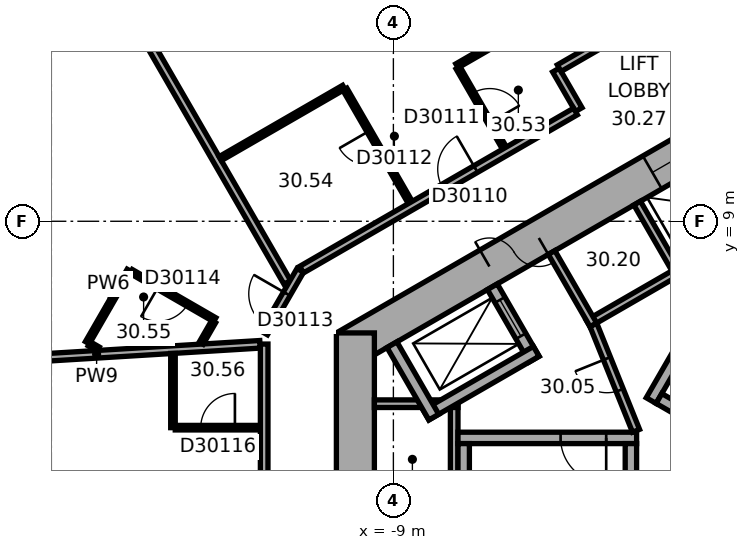
"""IFC4 building model, lengths in metres.
Left out: names, types, materials, properties, quantities, classifications, styles, units other than length and angle.
Written with IfcOpenShell. Run it as: python <this file> out.ifc"""

import sys

from ifc_helpers import new_model, si_unit, direction, frame, frame_2d, origin, place, context, subcontext, project, spatial, rectangle, extrude, element, fill, save


model = new_model("IFC4")
c1 = context("Model", 3, precision=1e-05, world=origin(), true_north=direction((0.0, 1.0)))
c2 = subcontext(c1, "Body", "Model", "MODEL_VIEW")
j1 = project(units=[si_unit("LENGTHUNIT", "METRE"), si_unit("PLANEANGLEUNIT", "RADIAN")], contexts=[c1])
p1 = place(None, origin())
s1 = spatial("IfcSite", under=j1, at=p1, CompositionType="ELEMENT")
p2 = place(p1, origin())
s2 = spatial("IfcBuilding", under=s1, at=p2, CompositionType="ELEMENT")
p3 = place(p2, frame((0.0, 0.0, 124.4)))
s3 = spatial("IfcBuildingStorey", under=s2, at=p3, CompositionType="ELEMENT", Elevation=124.4)
p4 = place(p3, frame((0.25, 11.691, 0.0), z_axis=(0.0, 0.0, 1.0), x_axis=(-0.866022616891, -0.50000482701, 0.0)))
e1 = element("IfcWall", 1, at=p4, inside=s3, PredefinedType="SHEAR", context=c2, shape_type="SweptSolid", body=[
    extrude(rectangle(XDim=12.125, YDim=1.0, at=frame_2d((6.062, 0.0))), origin(), (0.0, 0.0, 1.0), 3.7),
])
p5 = place(p4, frame((6.262, 0.0, 0.0)))
e2 = element("IfcOpeningElement", 2, at=p5, cuts=e1, PredefinedType="OPENING", context=c2, shape_type="SweptSolid", body=[
    extrude(rectangle(XDim=1.5, YDim=2.1, at=frame_2d((0.75, 1.05))), frame((0.0, 0.51, 0.0), z_axis=(0.0, -1.0, 0.0), x_axis=(1.0, 0.0, 0.0)), (0.0, 0.0, 1.0), 1.02),
])
p6 = place(p4, frame((1.712, 0.0, 0.0)))
e3 = element("IfcOpeningElement", 3, at=p6, cuts=e1, PredefinedType="OPENING", context=c2, shape_type="SweptSolid", body=[
    extrude(rectangle(XDim=1.1, YDim=2.1, at=frame_2d((0.55, 1.05))), frame((0.0, 0.51, 0.0), z_axis=(0.0, -1.0, 0.0), x_axis=(1.0, 0.0, 0.0)), (0.0, 0.0, 1.0), 1.02),
])
p7 = place(p3, frame((-10.0, 6.062, 0.0), z_axis=(0.0, 0.0, 1.0), x_axis=(0.0, -1.0, 0.0)))
e4 = element("IfcWall", 4, at=p7, inside=s3, PredefinedType="SHEAR", context=c2, shape_type="SweptSolid", body=[
    extrude(rectangle(XDim=12.125, YDim=1.0, at=frame_2d((6.062, 0.0))), origin(), (0.0, 0.0, 1.0), 3.7),
])
p8 = place(p7, frame((6.612, 0.0, 0.0)))
e5 = element("IfcOpeningElement", 5, at=p8, cuts=e4, PredefinedType="OPENING", context=c2, shape_type="SweptSolid", body=[
    extrude(rectangle(XDim=0.9, YDim=2.1, at=frame_2d((0.45, 1.05))), frame((0.0, 0.51, 0.0), z_axis=(0.0, -1.0, 0.0), x_axis=(1.0, 0.0, 0.0)), (0.0, 0.0, 1.0), 1.02),
])
p9 = place(p3, frame((-2.961, 23.405, 0.0), z_axis=(0.0, 0.0, 1.0), x_axis=(-0.866023315909, -0.500003616288, 0.0)))
e6 = element("IfcWall", 6, at=p9, inside=s3, PredefinedType="STANDARD", context=c2, shape_type="SweptSolid", body=[
    extrude(rectangle(XDim=20.044, YDim=0.2, at=frame_2d((10.022, 0.0))), origin(), (0.0, 0.0, 1.0), 3.7),
])
p10 = place(p9, frame((1.314, 0.0, 0.9)))
e7 = element("IfcOpeningElement", 7, at=p10, cuts=e6, PredefinedType="OPENING", context=c2, shape_type="SweptSolid", body=[
    extrude(rectangle(XDim=2.4, YDim=2.0, at=frame_2d((1.2, 1.0))), frame((0.0, 0.11, 0.0), z_axis=(0.0, -1.0, 0.0), x_axis=(1.0, 0.0, 0.0)), (0.0, 0.0, 1.0), 0.22),
])
p11 = place(p9, frame((5.069, 0.0, 0.9)))
e8 = element("IfcOpeningElement", 8, at=p11, cuts=e6, PredefinedType="OPENING", context=c2, shape_type="SweptSolid", body=[
    extrude(rectangle(XDim=2.4, YDim=2.0, at=frame_2d((1.2, 1.0))), frame((0.0, 0.11, 0.0), z_axis=(0.0, -1.0, 0.0), x_axis=(1.0, 0.0, 0.0)), (0.0, 0.0, 1.0), 0.22),
])
p12 = place(p9, frame((8.823, 0.0, 0.9)))
e9 = element("IfcOpeningElement", 9, at=p12, cuts=e6, PredefinedType="OPENING", context=c2, shape_type="SweptSolid", body=[
    extrude(rectangle(XDim=2.4, YDim=2.0, at=frame_2d((1.2, 1.0))), frame((0.0, 0.11, 0.0), z_axis=(0.0, -1.0, 0.0), x_axis=(1.0, 0.0, 0.0)), (0.0, 0.0, 1.0), 0.22),
])
p13 = place(p9, frame((12.577, 0.0, 0.9)))
e10 = element("IfcOpeningElement", 10, at=p13, cuts=e6, PredefinedType="OPENING", context=c2, shape_type="SweptSolid", body=[
    extrude(rectangle(XDim=2.4, YDim=2.0, at=frame_2d((1.2, 1.0))), frame((0.0, 0.11, 0.0), z_axis=(0.0, -1.0, 0.0), x_axis=(1.0, 0.0, 0.0)), (0.0, 0.0, 1.0), 0.22),
])
p14 = place(p9, frame((16.331, 0.0, 0.9)))
e11 = element("IfcOpeningElement", 11, at=p14, cuts=e6, PredefinedType="OPENING", context=c2, shape_type="SweptSolid", body=[
    extrude(rectangle(XDim=2.4, YDim=2.0, at=frame_2d((1.2, 1.0))), frame((0.0, 0.11, 0.0), z_axis=(0.0, -1.0, 0.0), x_axis=(1.0, 0.0, 0.0)), (0.0, 0.0, 1.0), 0.22),
])
p15 = place(p3, frame((0.803, 9.009, 0.0), z_axis=(0.0, 0.0, 1.0), x_axis=(-0.866028230842, -0.499995103361, 0.0)))
e12 = element("IfcWall", 12, at=p15, inside=s3, PredefinedType="PARTITIONING", context=c2, shape_type="SweptSolid", body=[
    extrude(rectangle(XDim=5.4, YDim=0.2, at=frame_2d((2.7, 0.0))), origin(), (0.0, 0.0, 1.0), 3.42),
])
for number, where, z_axis, x_axis in (
    (13, (-1.485, 7.572, 0.0), (0.0, 0.0, 1.0), (-0.5, 0.866, 0.0)),
    (14, (-3.737, 6.272, 0.0), (0.0, 0.0, 1.0), (-0.5, 0.866, 0.0)),
):
    element("IfcWall", number, at=place(p3, frame(where, z_axis=z_axis, x_axis=x_axis)), inside=s3, PredefinedType="PARTITIONING", context=c2, shape_type="SweptSolid", body=[
        extrude(rectangle(XDim=2.2, YDim=0.2, at=frame_2d((1.1, 0.0))), origin(), (0.0, 0.0, 1.0), 3.42),
    ])
p16 = place(p3, frame((-7.4, 4.3, 0.0), z_axis=(0.0, 0.0, 1.0), x_axis=(0.0, -1.0, 0.0)))
e15 = element("IfcWall", 15, at=p16, inside=s3, PredefinedType="PARTITIONING", context=c2, shape_type="SweptSolid", body=[
    extrude(rectangle(XDim=8.0, YDim=0.2, at=frame_2d((4.0, 0.0))), origin(), (0.0, 0.0, 1.0), 3.42),
])
p17 = place(p3, frame((-7.3, 4.2, 0.0), z_axis=(0.0, 0.0, 1.0), x_axis=(-1.0, 0.0, 0.0)))
e16 = element("IfcWall", 16, at=p17, inside=s3, PredefinedType="PARTITIONING", context=c2, shape_type="SweptSolid", body=[
    extrude(rectangle(XDim=2.2, YDim=0.2, at=frame_2d((1.1, 0.0))), origin(), (0.0, 0.0, 1.0), 3.42),
])
p18 = place(p3, frame((-2.216, 4.282, 0.0), z_axis=(0.0, 0.0, 1.0), x_axis=(0.499977259774, 0.866038532462, 0.0)))
e17 = element("IfcWall", 17, at=p18, inside=s3, PredefinedType="SHEAR", context=c2, shape_type="SweptSolid", body=[
    extrude(rectangle(XDim=4.7, YDim=0.3, at=frame_2d((2.35, 0.0))), origin(), (0.0, 0.0, 1.0), 3.42),
])
p19 = place(p3, frame((4.103, 0.807, 0.0), z_axis=(0.0, 0.0, 1.0), x_axis=(-0.866027801685, 0.499995846692, 0.0)))
e18 = element("IfcWall", 18, at=p19, inside=s3, PredefinedType="SHEAR", context=c2, shape_type="SweptSolid", body=[
    extrude(rectangle(XDim=7.06, YDim=0.3, at=frame_2d((3.53, 0.0))), origin(), (0.0, 0.0, 1.0), 3.42),
])
p20 = place(p3, frame((-2.6, 3.3, 0.0), z_axis=(0.0, 0.0, 1.0), x_axis=(-1.0, 0.0, 0.0)))
e19 = element("IfcWall", 19, at=p20, inside=s3, PredefinedType="SHEAR", context=c2, shape_type="SweptSolid", body=[
    extrude(rectangle(XDim=4.7, YDim=0.3, at=frame_2d((2.35, 0.0))), origin(), (0.0, 0.0, 1.0), 3.42),
])
p21 = place(p20, frame((0.8, 0.0, 0.0)))
e20 = element("IfcOpeningElement", 20, at=p21, cuts=e19, PredefinedType="OPENING", context=c2, shape_type="SweptSolid", body=[
    extrude(rectangle(XDim=1.2, YDim=2.1, at=frame_2d((0.6, 1.05))), frame((0.0, 0.16, 0.0), z_axis=(0.0, -1.0, 0.0), x_axis=(1.0, 0.0, 0.0)), (0.0, 0.0, 1.0), 0.32),
])
for number, where, z_axis, x_axis in (
    (21, (-2.75, 3.15, 0.0), (0.0, 0.0, 1.0), (0.0, -1.0, 0.0)),
    (22, (-7.15, 3.15, 0.0), (0.0, 0.0, 1.0), (0.0, -1.0, 0.0)),
):
    element("IfcWall", number, at=place(p3, frame(where, z_axis=z_axis, x_axis=x_axis)), inside=s3, PredefinedType="SHEAR", context=c2, shape_type="SweptSolid", body=[
        extrude(rectangle(XDim=7.06, YDim=0.3, at=frame_2d((3.53, 0.0))), origin(), (0.0, 0.0, 1.0), 3.42),
    ])
p22 = place(p3, frame((-5.295, 5.372, 0.0), z_axis=(0.0, 0.0, 1.0), x_axis=(-0.500077893725, 0.86598042715, 0.0)))
e23 = element("IfcWall", 23, at=p22, inside=s3, PredefinedType="SHEAR", context=c2, shape_type="SweptSolid", body=[
    extrude(rectangle(XDim=2.2, YDim=0.3, at=frame_2d((1.1, 0.0))), origin(), (0.0, 0.0, 1.0), 3.42),
])
p23 = place(p22, frame((0.7, 0.0, 0.0)))
e24 = element("IfcOpeningElement", 24, at=p23, cuts=e23, PredefinedType="OPENING", context=c2, shape_type="SweptSolid", body=[
    extrude(rectangle(XDim=1.1, YDim=2.1, at=frame_2d((0.55, 1.05))), frame((0.0, 0.16, 0.0), z_axis=(0.0, -1.0, 0.0), x_axis=(1.0, 0.0, 0.0)), (0.0, 0.0, 1.0), 0.32),
])
p24 = place(p3, frame((-5.24, 5.577, 0.0), z_axis=(0.0, 0.0, 1.0), x_axis=(-0.866014461049, -0.500018952895, 0.0)))
e25 = element("IfcWall", 25, at=p24, inside=s3, PredefinedType="SHEAR", context=c2, shape_type="SweptSolid", body=[
    extrude(rectangle(XDim=3.35, YDim=0.3, at=frame_2d((1.675, 0.0))), origin(), (0.0, 0.0, 1.0), 3.42),
])
p25 = place(p3, frame((-7.937, 3.847, 0.0), z_axis=(0.0, 0.0, 1.0), x_axis=(-0.50002983664, 0.866008176907, 0.0)))
e26 = element("IfcWall", 26, at=p25, inside=s3, PredefinedType="SHEAR", context=c2, shape_type="SweptSolid", body=[
    extrude(rectangle(XDim=2.2, YDim=0.3, at=frame_2d((1.1, 0.0))), origin(), (0.0, 0.0, 1.0), 3.42),
])
p26 = place(p3, frame((-2.615, 3.487, 0.0), z_axis=(0.0, 0.0, 1.0), x_axis=(-0.373576831041, 0.92759924068, 0.0)))
e27 = element("IfcWall", 27, at=p26, inside=s3, PredefinedType="PARTITIONING", context=c2, shape_type="SweptSolid", body=[
    extrude(rectangle(XDim=3.002, YDim=0.2, at=frame_2d((1.501, 0.0))), origin(), (0.0, 0.0, 1.0), 3.42),
])
p27 = place(p26, frame((1.15, 0.0, 0.0)))
e28 = element("IfcOpeningElement", 28, at=p27, cuts=e27, PredefinedType="OPENING", context=c2, shape_type="SweptSolid", body=[
    extrude(rectangle(XDim=0.9, YDim=2.1, at=frame_2d((0.45, 1.05))), frame((0.0, 0.11, 0.0), z_axis=(0.0, -1.0, 0.0), x_axis=(1.0, 0.0, 0.0)), (0.0, 0.0, 1.0), 0.22),
])
p28 = place(p3, frame((-21.109, 5.237, 0.0), z_axis=(0.0, 0.0, 1.0), x_axis=(0.998135264293, 0.061040922131, 0.0)))
e29 = element("IfcWall", 29, at=p28, inside=s3, PredefinedType="PARTITIONING", context=c2, shape_type="SweptSolid", body=[
    extrude(rectangle(XDim=8.615, YDim=0.2, at=frame_2d((4.308, 0.0))), origin(), (0.0, 0.0, 1.0), 3.42),
])
p29 = place(p3, frame((-17.052, 5.804, 0.0), z_axis=(0.0, 0.0, 1.0), x_axis=(0.50002983664, 0.866008176907, 0.0)))
e30 = element("IfcWall", 30, at=p29, inside=s3, PredefinedType="PARTITIONING", context=c2, shape_type="SweptSolid", body=[
    extrude(rectangle(XDim=2.2, YDim=0.12, at=frame_2d((1.1, 0.0))), origin(), (0.0, 0.0, 1.0), 3.42),
])
p30 = place(p3, frame((-16.769, 5.64, 0.0), z_axis=(0.0, 0.0, 1.0), x_axis=(-0.865926680471, 0.500170954823, 0.0)))
e31 = element("IfcWall", 31, at=p30, inside=s3, PredefinedType="PARTITIONING", context=c2, shape_type="SweptSolid", body=[
    extrude(rectangle(XDim=0.267, YDim=0.12, at=frame_2d((0.134, 0.0))), origin(), (0.0, 0.0, 1.0), 3.42),
])
p31 = place(p3, frame((-16.018, 14.712, 0.0), z_axis=(0.0, 0.0, 1.0), x_axis=(0.500000843414, -0.866024916838, 0.0)))
e32 = element("IfcWall", 32, at=p31, inside=s3, PredefinedType="PARTITIONING", context=c2, shape_type="SweptSolid", body=[
    extrude(rectangle(XDim=8.452, YDim=0.2, at=frame_2d((4.226, 0.0))), origin(), (0.0, 0.0, 1.0), 3.42),
])
p32 = place(p3, frame((-15.9, 7.679, 0.0), z_axis=(0.0, 0.0, 1.0), x_axis=(0.866022320763, -0.500005339912, 0.0)))
e33 = element("IfcWall", 33, at=p32, inside=s3, PredefinedType="PARTITIONING", context=c2, shape_type="SweptSolid", body=[
    extrude(rectangle(XDim=2.54, YDim=0.12, at=frame_2d((1.27, 0.0))), origin(), (0.0, 0.0, 1.0), 3.42),
])
p33 = place(p32, frame((0.82, 0.0, 0.0)))
e34 = element("IfcOpeningElement", 34, at=p33, cuts=e33, PredefinedType="OPENING", context=c2, shape_type="SweptSolid", body=[
    extrude(rectangle(XDim=0.9, YDim=2.1, at=frame_2d((0.45, 1.05))), frame((0.0, 0.07, 0.0), z_axis=(0.0, -1.0, 0.0), x_axis=(1.0, 0.0, 0.0)), (0.0, 0.0, 1.0), 0.14),
])
p34 = place(p3, frame((-14.8, 3.569, 0.0), z_axis=(0.0, 0.0, 1.0), x_axis=(0.0, 1.0, 0.0)))
e35 = element("IfcWall", 35, at=p34, inside=s3, PredefinedType="PARTITIONING", context=c2, shape_type="SweptSolid", body=[
    extrude(rectangle(XDim=1.953, YDim=0.12, at=frame_2d((0.977, 0.0))), origin(), (0.0, 0.0, 1.0), 3.42),
])
p35 = place(p3, frame((-13.731, 6.357, 0.0), z_axis=(0.0, 0.0, 1.0), x_axis=(-0.500090215447, -0.865973311606, 0.0)))
e36 = element("IfcWall", 36, at=p35, inside=s3, PredefinedType="PARTITIONING", context=c2, shape_type="SweptSolid", body=[
    extrude(rectangle(XDim=0.651, YDim=0.12, at=frame_2d((0.326, 0.0))), origin(), (0.0, 0.0, 1.0), 3.42),
])
p36 = place(p3, frame((-13.556, 10.649, 0.0), z_axis=(0.0, 0.0, 1.0), x_axis=(0.866020939036, 0.500007733091, 0.0)))
e37 = element("IfcWall", 37, at=p36, inside=s3, PredefinedType="PARTITIONING", context=c2, shape_type="SweptSolid", body=[
    extrude(rectangle(XDim=3.753, YDim=0.12, at=frame_2d((1.877, 0.0))), origin(), (0.0, 0.0, 1.0), 3.42),
])
p37 = place(p3, frame((-12.5, 3.569, 0.0), z_axis=(0.0, 0.0, 1.0), x_axis=(-1.0, 0.0, 0.0)))
e38 = element("IfcWall", 38, at=p37, inside=s3, PredefinedType="PARTITIONING", context=c2, shape_type="SweptSolid", body=[
    extrude(rectangle(XDim=2.24, YDim=0.12, at=frame_2d((1.12, 0.0))), origin(), (0.0, 0.0, 1.0), 3.42),
])
p38 = place(p37, frame((0.67, 0.0, 0.0)))
e39 = element("IfcOpeningElement", 39, at=p38, cuts=e38, PredefinedType="OPENING", context=c2, shape_type="SweptSolid", body=[
    extrude(rectangle(XDim=0.9, YDim=2.1, at=frame_2d((0.45, 1.05))), frame((0.0, 0.07, 0.0), z_axis=(0.0, -1.0, 0.0), x_axis=(1.0, 0.0, 0.0)), (0.0, 0.0, 1.0), 0.14),
])
p39 = place(p3, frame((-12.4, 5.769, 0.0), z_axis=(0.0, 0.0, 1.0), x_axis=(0.0, -1.0, 0.0)))
e40 = element("IfcWall", 40, at=p39, inside=s3, PredefinedType="PARTITIONING", context=c2, shape_type="SweptSolid", body=[
    extrude(rectangle(XDim=11.792, YDim=0.2, at=frame_2d((5.896, 0.0))), origin(), (0.0, 0.0, 1.0), 3.42),
])
p40 = place(p39, frame((6.267, 0.0, 0.0)))
e41 = element("IfcOpeningElement", 41, at=p40, cuts=e40, PredefinedType="OPENING", context=c2, shape_type="SweptSolid", body=[
    extrude(rectangle(XDim=1.0, YDim=2.1, at=frame_2d((0.5, 1.05))), frame((0.0, 0.11, 0.0), z_axis=(0.0, -1.0, 0.0), x_axis=(1.0, 0.0, 0.0)), (0.0, 0.0, 1.0), 0.22),
])
p41 = place(p3, frame((-11.45, 7.708, 0.0), z_axis=(0.0, 0.0, 1.0), x_axis=(-0.500022797313, -0.86601224135, 0.0)))
e42 = element("IfcWall", 42, at=p41, inside=s3, PredefinedType="PARTITIONING", context=c2, shape_type="SweptSolid", body=[
    extrude(rectangle(XDim=1.9, YDim=0.2, at=frame_2d((0.95, 0.0))), origin(), (0.0, 0.0, 1.0), 3.42),
])
p42 = place(p41, frame((0.712, 0.0, 0.0)))
e43 = element("IfcOpeningElement", 43, at=p42, cuts=e42, PredefinedType="OPENING", context=c2, shape_type="SweptSolid", body=[
    extrude(rectangle(XDim=1.0, YDim=2.1, at=frame_2d((0.5, 1.05))), frame((0.0, 0.11, 0.0), z_axis=(0.0, -1.0, 0.0), x_axis=(1.0, 0.0, 0.0)), (0.0, 0.0, 1.0), 0.22),
])
p43 = place(p3, frame((-10.275, 12.473, 0.0), z_axis=(0.0, 0.0, 1.0), x_axis=(0.500009156386, -0.866020117278, 0.0)))
e44 = element("IfcWall", 44, at=p43, inside=s3, PredefinedType="PARTITIONING", context=c2, shape_type="SweptSolid", body=[
    extrude(rectangle(XDim=3.44, YDim=0.12, at=frame_2d((1.72, 0.0))), origin(), (0.0, 0.0, 1.0), 3.42),
])
p44 = place(p43, frame((1.27, 0.0, 0.0)))
e45 = element("IfcOpeningElement", 45, at=p44, cuts=e44, PredefinedType="OPENING", context=c2, shape_type="SweptSolid", body=[
    extrude(rectangle(XDim=0.9, YDim=2.1, at=frame_2d((0.45, 1.05))), frame((0.0, 0.07, 0.0), z_axis=(0.0, -1.0, 0.0), x_axis=(1.0, 0.0, 0.0)), (0.0, 0.0, 1.0), 0.14),
])
p45 = place(p3, frame((-7.328, 13.09, 0.0), z_axis=(0.0, 0.0, 1.0), x_axis=(0.866008981251, 0.500028443584, 0.0)))
e46 = element("IfcWall", 46, at=p45, inside=s3, PredefinedType="PARTITIONING", context=c2, shape_type="SweptSolid", body=[
    extrude(rectangle(XDim=3.2, YDim=0.12, at=frame_2d((1.6, 0.0))), origin(), (0.0, 0.0, 1.0), 3.42),
])
p46 = place(p3, frame((-6.078, 10.925, 0.0), z_axis=(0.0, 0.0, 1.0), x_axis=(-0.500002508028, 0.866023955769, 0.0)))
e47 = element("IfcWall", 47, at=p46, inside=s3, PredefinedType="PARTITIONING", context=c2, shape_type="SweptSolid", body=[
    extrude(rectangle(XDim=2.44, YDim=0.12, at=frame_2d((1.22, 0.0))), origin(), (0.0, 0.0, 1.0), 2.87),
])
p47 = place(p46, frame((0.77, 0.0, 0.0)))
e48 = element("IfcOpeningElement", 48, at=p47, cuts=e47, PredefinedType="OPENING", context=c2, shape_type="SweptSolid", body=[
    extrude(rectangle(XDim=0.9, YDim=2.1, at=frame_2d((0.45, 1.05))), frame((0.0, 0.07, 0.0), z_axis=(0.0, -1.0, 0.0), x_axis=(1.0, 0.0, 0.0)), (0.0, 0.0, 1.0), 0.14),
])
p48 = place(p3, frame((-4.723, 12.978, 0.0), z_axis=(0.0, 0.0, 1.0), x_axis=(0.500074377092, -0.865982457891, 0.0)))
e49 = element("IfcWall", 49, at=p48, inside=s3, PredefinedType="PARTITIONING", context=c2, shape_type="SweptSolid", body=[
    extrude(rectangle(XDim=1.201, YDim=0.2, at=frame_2d((0.601, 0.0))), origin(), (0.0, 0.0, 1.0), 3.42),
])
p49 = place(p3, frame((-4.209, 11.888, 0.0), z_axis=(0.0, 0.0, 1.0), x_axis=(-0.866020930448, -0.500007747966, 0.0)))
e50 = element("IfcWall", 50, at=p49, inside=s3, PredefinedType="PARTITIONING", context=c2, shape_type="SweptSolid", body=[
    extrude(rectangle(XDim=8.321, YDim=0.2, at=frame_2d((4.161, 0.0))), origin(), (0.0, 0.0, 1.0), 3.42),
])
p50 = place(p49, frame((3.031, 0.0, 0.0)))
e51 = element("IfcOpeningElement", 51, at=p50, cuts=e50, PredefinedType="OPENING", context=c2, shape_type="SweptSolid", body=[
    extrude(rectangle(XDim=1.0, YDim=2.1, at=frame_2d((0.5, 1.05))), frame((0.0, 0.11, 0.0), z_axis=(0.0, -1.0, 0.0), x_axis=(1.0, 0.0, 0.0)), (0.0, 0.0, 1.0), 0.22),
])
p51 = place(p3, frame((-1.95, 14.579, 0.0), z_axis=(0.0, 0.0, 1.0), x_axis=(-0.866011260204, -0.500024496599, 0.0)))
e52 = element("IfcWall", 52, at=p51, inside=s3, PredefinedType="PARTITIONING", context=c2, shape_type="SweptSolid", body=[
    extrude(rectangle(XDim=3.102, YDim=0.2, at=frame_2d((1.551, 0.0))), origin(), (0.0, 0.0, 1.0), 3.42),
])
p52 = place(p5, origin())
e53 = element("IfcDoor", 53, at=p52, inside=s3, OperationType="DOUBLE_DOOR_SINGLE_SWING", PredefinedType="DOOR", context=c2, shape_type="SweptSolid", body=[
    extrude(rectangle(XDim=1.5, YDim=2.1, at=frame_2d((0.75, 1.05))), frame((0.0, 0.025, 0.0), z_axis=(0.0, -1.0, 0.0), x_axis=(1.0, 0.0, 0.0)), (0.0, 0.0, 1.0), 0.05),
])
fill(e2, e53)
p53 = place(p21, origin())
e54 = element("IfcDoor", 54, at=p53, inside=s3, OperationType="SINGLE_SWING_RIGHT", PredefinedType="DOOR", context=c2, shape_type="SweptSolid", body=[
    extrude(rectangle(XDim=1.2, YDim=2.1, at=frame_2d((0.6, 1.05))), frame((0.0, 0.025, 0.0), z_axis=(0.0, -1.0, 0.0), x_axis=(1.0, 0.0, 0.0)), (0.0, 0.0, 1.0), 0.05),
])
fill(e20, e54)
p54 = place(p27, origin())
e55 = element("IfcDoor", 55, at=p54, inside=s3, OperationType="SINGLE_SWING_LEFT", PredefinedType="DOOR", context=c2, shape_type="SweptSolid", body=[
    extrude(rectangle(XDim=0.9, YDim=2.1, at=frame_2d((0.45, 1.05))), frame((0.0, 0.025, 0.0), z_axis=(0.0, -1.0, 0.0), x_axis=(1.0, 0.0, 0.0)), (0.0, 0.0, 1.0), 0.05),
])
fill(e28, e55)
p55 = place(p23, origin())
e56 = element("IfcDoor", 56, at=p55, inside=s3, OperationType="DOUBLE_DOOR_SLIDING", PredefinedType="DOOR", context=c2, shape_type="SweptSolid", body=[
    extrude(rectangle(XDim=1.1, YDim=2.1, at=frame_2d((0.55, 1.05))), frame((0.0, 0.025, 0.0), z_axis=(0.0, -1.0, 0.0), x_axis=(1.0, 0.0, 0.0)), (0.0, 0.0, 1.0), 0.05),
])
fill(e24, e56)
p56 = place(p6, origin())
e57 = element("IfcDoor", 57, at=p56, inside=s3, OperationType="DOUBLE_DOOR_SLIDING", PredefinedType="DOOR", context=c2, shape_type="SweptSolid", body=[
    extrude(rectangle(XDim=1.1, YDim=2.1, at=frame_2d((0.55, 1.05))), frame((0.0, 0.025, 0.0), z_axis=(0.0, -1.0, 0.0), x_axis=(1.0, 0.0, 0.0)), (0.0, 0.0, 1.0), 0.05),
])
fill(e3, e57)
p57 = place(p50, origin())
e58 = element("IfcDoor", 58, at=p57, inside=s3, OperationType="SINGLE_SWING_LEFT", PredefinedType="DOOR", context=c2, shape_type="SweptSolid", body=[
    extrude(rectangle(XDim=1.0, YDim=2.1, at=frame_2d((0.5, 1.05))), frame((0.0, 0.025, 0.0), z_axis=(0.0, -1.0, 0.0), x_axis=(1.0, 0.0, 0.0)), (0.0, 0.0, 1.0), 0.05),
])
fill(e51, e58)
p58 = place(p47, origin())
e59 = element("IfcDoor", 59, at=p58, inside=s3, OperationType="SINGLE_SWING_LEFT", PredefinedType="DOOR", context=c2, shape_type="SweptSolid", body=[
    extrude(rectangle(XDim=0.9, YDim=2.1, at=frame_2d((0.45, 1.05))), frame((0.0, 0.025, 0.0), z_axis=(0.0, -1.0, 0.0), x_axis=(1.0, 0.0, 0.0)), (0.0, 0.0, 1.0), 0.05),
])
fill(e48, e59)
p59 = place(p44, origin())
e60 = element("IfcDoor", 60, at=p59, inside=s3, OperationType="SINGLE_SWING_LEFT", PredefinedType="DOOR", context=c2, shape_type="SweptSolid", body=[
    extrude(rectangle(XDim=0.9, YDim=2.1, at=frame_2d((0.45, 1.05))), frame((0.0, 0.025, 0.0), z_axis=(0.0, -1.0, 0.0), x_axis=(1.0, 0.0, 0.0)), (0.0, 0.0, 1.0), 0.05),
])
fill(e45, e60)
p60 = place(p42, origin())
e61 = element("IfcDoor", 61, at=p60, inside=s3, OperationType="SINGLE_SWING_LEFT", PredefinedType="DOOR", context=c2, shape_type="SweptSolid", body=[
    extrude(rectangle(XDim=1.0, YDim=2.1, at=frame_2d((0.5, 1.05))), frame((0.0, 0.025, 0.0), z_axis=(0.0, -1.0, 0.0), x_axis=(1.0, 0.0, 0.0)), (0.0, 0.0, 1.0), 0.05),
])
fill(e43, e61)
p61 = place(p33, origin())
e62 = element("IfcDoor", 62, at=p61, inside=s3, OperationType="SINGLE_SWING_LEFT", PredefinedType="DOOR", context=c2, shape_type="SweptSolid", body=[
    extrude(rectangle(XDim=0.9, YDim=2.1, at=frame_2d((0.45, 1.05))), frame((0.0, 0.025, 0.0), z_axis=(0.0, -1.0, 0.0), x_axis=(1.0, 0.0, 0.0)), (0.0, 0.0, 1.0), 0.05),
])
fill(e34, e62)
p62 = place(p38, origin())
e63 = element("IfcDoor", 63, at=p62, inside=s3, OperationType="SINGLE_SWING_LEFT", PredefinedType="DOOR", context=c2, shape_type="SweptSolid", body=[
    extrude(rectangle(XDim=0.9, YDim=2.1, at=frame_2d((0.45, 1.05))), frame((0.0, 0.025, 0.0), z_axis=(0.0, -1.0, 0.0), x_axis=(1.0, 0.0, 0.0)), (0.0, 0.0, 1.0), 0.05),
])
fill(e39, e63)
save(model, sys.argv[1])
